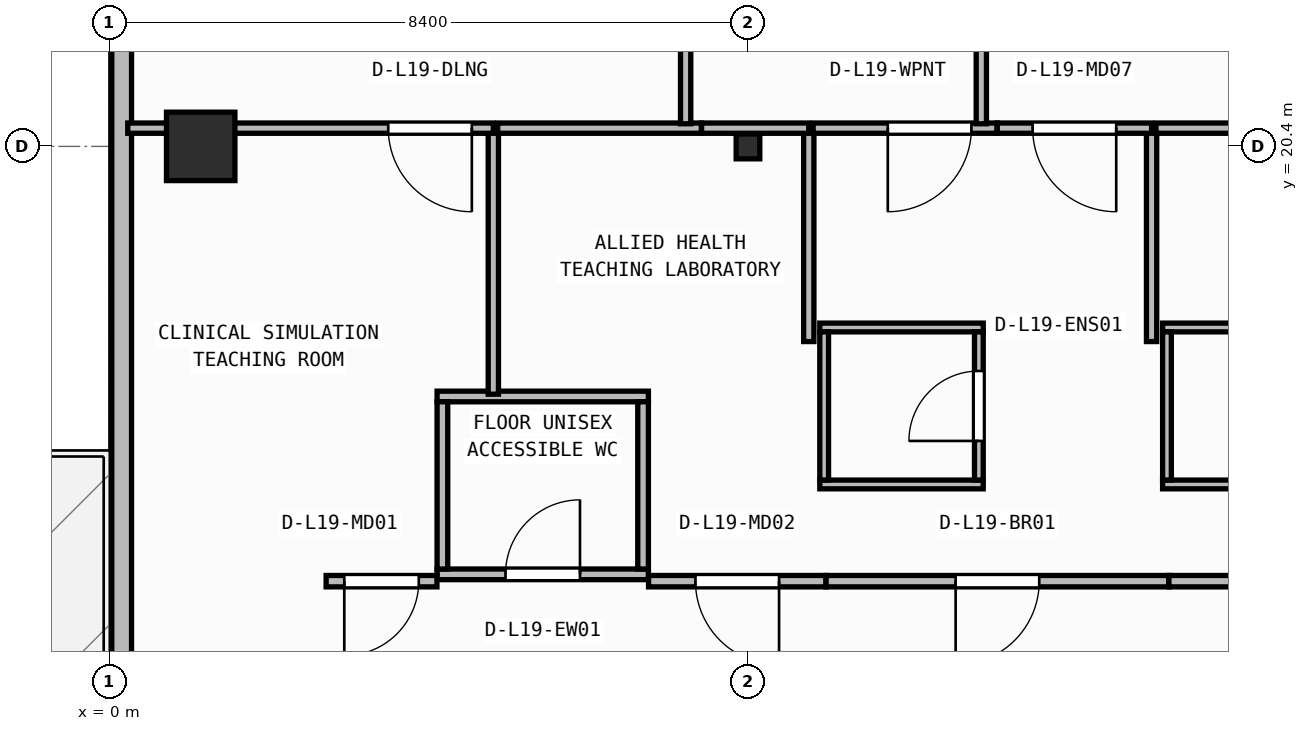
"""IFC4 building model, lengths in metres.
Left out: names, types, materials, properties, quantities, classifications, styles, units other than length and angle.
Written with IfcOpenShell. Run it as: python <this file> out.ifc"""

import sys

from ifc_helpers import new_model, si_unit, direction, frame, frame_2d, origin, origin_2d, place, context, subcontext, project, spatial, rectangle, i_section, extrude, element, fill, save


model = new_model("IFC4")
c1 = context("Model", 3, precision=1e-05, world=origin(), true_north=direction((0.0, 1.0)))
c2 = subcontext(c1, "Body", "Model", "MODEL_VIEW")
j1 = project(units=[si_unit("LENGTHUNIT", "METRE"), si_unit("PLANEANGLEUNIT", "RADIAN")], contexts=[c1])
p1 = place(None, origin())
s1 = spatial("IfcSite", under=j1, at=p1, CompositionType="ELEMENT")
p2 = place(p1, origin())
s2 = spatial("IfcBuilding", under=s1, at=p2, CompositionType="ELEMENT")
p3 = place(p2, frame((0.0, 0.0, 77.8)))
s3 = spatial("IfcBuildingStorey", under=s2, at=p3, CompositionType="ELEMENT", Elevation=77.8)
p4 = place(p3, frame((1.2, 20.4, 0.0), z_axis=(0.0, 0.0, 1.0), x_axis=(1.0, 0.0, 0.0)))
e1 = element("IfcColumn", 1, at=p4, inside=s3, PredefinedType="COLUMN", context=c2, shape_type="SweptSolid", body=[
    extrude(rectangle(XDim=0.9, YDim=0.9, at=origin_2d()), origin(), (0.0, 0.0, 1.0), 3.95),
])
p5 = place(p3, frame((8.4, 20.4, 0.0), z_axis=(0.0, 0.0, 1.0), x_axis=(1.0, 0.0, 0.0)))
e2 = element("IfcColumn", 2, at=p5, inside=s3, PredefinedType="COLUMN", context=c2, shape_type="SweptSolid", body=[
    extrude(i_section(OverallWidth=0.311, OverallDepth=0.327, WebThickness=0.016, FlangeThickness=0.025, FilletRadius=0.017, at=origin_2d()), origin(), (0.0, 0.0, 1.0), 3.95),
])
p6 = place(p3, frame((0.16, 41.04, 0.0), z_axis=(0.0, 0.0, 1.0), x_axis=(0.0, -1.0, 0.0)))
e3 = element("IfcWall", 3, at=p6, inside=s3, PredefinedType="STANDARD", context=c2, shape_type="SweptSolid", body=[
    extrude(rectangle(XDim=38.28, YDim=0.26, at=frame_2d((19.14, 0.0))), origin(), (0.0, 0.0, 1.0), 3.71),
])
p7 = place(p6, frame((30.187, 0.0, 0.0)))
e4 = element("IfcOpeningElement", 4, at=p7, cuts=e3, PredefinedType="OPENING", context=c2, shape_type="SweptSolid", body=[
    extrude(rectangle(XDim=1.3, YDim=2.15, at=frame_2d((0.65, 1.075))), frame((0.0, 0.14, 0.0), z_axis=(0.0, -1.0, 0.0), x_axis=(1.0, 0.0, 0.0)), (0.0, 0.0, 1.0), 0.28),
])
p8 = place(p3, frame((4.31, 14.77, 0.0), z_axis=(0.0, 0.0, 1.0), x_axis=(1.0, 0.0, 0.0)))
e5 = element("IfcWall", 5, at=p8, inside=s3, PredefinedType="PARTITIONING", context=c2, shape_type="SweptSolid", body=[
    extrude(rectangle(XDim=2.78, YDim=0.14, at=frame_2d((1.39, 0.0))), origin(), (0.0, 0.0, 1.0), 3.71),
])
p9 = place(p8, frame((0.9, 0.0, 0.0)))
e6 = element("IfcOpeningElement", 6, at=p9, cuts=e5, PredefinedType="OPENING", context=c2, shape_type="SweptSolid", body=[
    extrude(rectangle(XDim=0.98, YDim=2.1, at=frame_2d((0.49, 1.05))), frame((0.0, 0.08, 0.0), z_axis=(0.0, -1.0, 0.0), x_axis=(1.0, 0.0, 0.0)), (0.0, 0.0, 1.0), 0.16),
])
p10 = place(p3, frame((4.31, 17.11, 0.0), z_axis=(0.0, 0.0, 1.0), x_axis=(1.0, 0.0, 0.0)))
e7 = element("IfcWall", 7, at=p10, inside=s3, PredefinedType="PARTITIONING", context=c2, shape_type="SweptSolid", body=[
    extrude(rectangle(XDim=2.78, YDim=0.14, at=frame_2d((1.39, 0.0))), origin(), (0.0, 0.0, 1.0), 3.71),
])
for number, where, z_axis, x_axis in (
    (8, (4.38, 14.84, 0.0), (0.0, 0.0, 1.0), (0.0, 1.0, 0.0)),
    (9, (7.02, 14.84, 0.0), (0.0, 0.0, 1.0), (0.0, 1.0, 0.0)),
):
    element("IfcWall", number, at=place(p3, frame(where, z_axis=z_axis, x_axis=x_axis)), inside=s3, PredefinedType="PARTITIONING", context=c2, shape_type="SweptSolid", body=[
        extrude(rectangle(XDim=2.2, YDim=0.14, at=frame_2d((1.1, 0.0))), origin(), (0.0, 0.0, 1.0), 3.71),
    ])
for number, where, z_axis, x_axis in (
    (10, (9.345, 15.952, 0.0), (0.0, 0.0, 1.0), (1.0, 0.0, 0.0)),
    (11, (9.345, 18.018, 0.0), (0.0, 0.0, 1.0), (1.0, 0.0, 0.0)),
):
    element("IfcWall", number, at=place(p3, frame(where, z_axis=z_axis, x_axis=x_axis)), inside=s3, PredefinedType="PARTITIONING", context=c2, shape_type="SweptSolid", body=[
        extrude(rectangle(XDim=2.15, YDim=0.115, at=frame_2d((1.075, 0.0))), origin(), (0.0, 0.0, 1.0), 3.71),
    ])
p11 = place(p3, frame((9.403, 16.01, 0.0), z_axis=(0.0, 0.0, 1.0), x_axis=(0.0, 1.0, 0.0)))
e12 = element("IfcWall", 12, at=p11, inside=s3, PredefinedType="PARTITIONING", context=c2, shape_type="SweptSolid", body=[
    extrude(rectangle(XDim=1.95, YDim=0.115, at=frame_2d((0.975, 0.0))), origin(), (0.0, 0.0, 1.0), 3.71),
])
p12 = place(p3, frame((11.438, 16.01, 0.0), z_axis=(0.0, 0.0, 1.0), x_axis=(0.0, 1.0, 0.0)))
e13 = element("IfcWall", 13, at=p12, inside=s3, PredefinedType="PARTITIONING", context=c2, shape_type="SweptSolid", body=[
    extrude(rectangle(XDim=1.95, YDim=0.115, at=frame_2d((0.975, 0.0))), origin(), (0.0, 0.0, 1.0), 3.71),
])
p13 = place(p12, frame((0.515, 0.0, 0.0)))
e14 = element("IfcOpeningElement", 14, at=p13, cuts=e13, PredefinedType="OPENING", context=c2, shape_type="SweptSolid", body=[
    extrude(rectangle(XDim=0.92, YDim=2.1, at=frame_2d((0.46, 1.05))), frame((0.0, 0.067, 0.0), z_axis=(0.0, -1.0, 0.0), x_axis=(1.0, 0.0, 0.0)), (0.0, 0.0, 1.0), 0.135),
])
for number, where, z_axis, x_axis in (
    (15, (13.855, 15.952, 0.0), (0.0, 0.0, 1.0), (1.0, 0.0, 0.0)),
    (16, (13.855, 18.018, 0.0), (0.0, 0.0, 1.0), (1.0, 0.0, 0.0)),
):
    element("IfcWall", number, at=place(p3, frame(where, z_axis=z_axis, x_axis=x_axis)), inside=s3, PredefinedType="PARTITIONING", context=c2, shape_type="SweptSolid", body=[
        extrude(rectangle(XDim=2.15, YDim=0.115, at=frame_2d((1.075, 0.0))), origin(), (0.0, 0.0, 1.0), 3.71),
    ])
p14 = place(p3, frame((13.913, 16.01, 0.0), z_axis=(0.0, 0.0, 1.0), x_axis=(0.0, 1.0, 0.0)))
e17 = element("IfcWall", 17, at=p14, inside=s3, PredefinedType="PARTITIONING", context=c2, shape_type="SweptSolid", body=[
    extrude(rectangle(XDim=1.95, YDim=0.115, at=frame_2d((0.975, 0.0))), origin(), (0.0, 0.0, 1.0), 3.71),
])
p15 = place(p3, frame((4.308, 14.68, 0.0), z_axis=(0.0, 0.0, 1.0), x_axis=(-1.0, 0.0, 0.0)))
e18 = element("IfcWall", 18, at=p15, inside=s3, PredefinedType="PARTITIONING", context=c2, shape_type="SweptSolid", body=[
    extrude(rectangle(XDim=1.458, YDim=0.15, at=frame_2d((0.729, 0.0))), origin(), (0.0, 0.0, 1.0), 3.71),
])
p16 = place(p15, frame((0.239, 0.0, 0.0)))
e19 = element("IfcOpeningElement", 19, at=p16, cuts=e18, PredefinedType="OPENING", context=c2, shape_type="SweptSolid", body=[
    extrude(rectangle(XDim=0.98, YDim=2.1, at=frame_2d((0.49, 1.05))), frame((0.0, 0.085, 0.0), z_axis=(0.0, -1.0, 0.0), x_axis=(1.0, 0.0, 0.0)), (0.0, 0.0, 1.0), 0.17),
])
p17 = place(p3, frame((9.426, 14.68, 0.0), z_axis=(0.0, 0.0, 1.0), x_axis=(-1.0, 0.0, 0.0)))
e20 = element("IfcWall", 20, at=p17, inside=s3, PredefinedType="PARTITIONING", context=c2, shape_type="SweptSolid", body=[
    extrude(rectangle(XDim=2.334, YDim=0.15, at=frame_2d((1.167, 0.0))), origin(), (0.0, 0.0, 1.0), 3.71),
])
p18 = place(p17, frame((0.617, 0.0, 0.0)))
e21 = element("IfcOpeningElement", 21, at=p18, cuts=e20, PredefinedType="OPENING", context=c2, shape_type="SweptSolid", body=[
    extrude(rectangle(XDim=1.1, YDim=2.1, at=frame_2d((0.55, 1.05))), frame((0.0, 0.085, 0.0), z_axis=(0.0, -1.0, 0.0), x_axis=(1.0, 0.0, 0.0)), (0.0, 0.0, 1.0), 0.17),
])
p19 = place(p3, frame((13.936, 14.68, 0.0), z_axis=(0.0, 0.0, 1.0), x_axis=(-1.0, 0.0, 0.0)))
e22 = element("IfcWall", 22, at=p19, inside=s3, PredefinedType="PARTITIONING", context=c2, shape_type="SweptSolid", body=[
    extrude(rectangle(XDim=4.508, YDim=0.15, at=frame_2d((2.254, 0.0))), origin(), (0.0, 0.0, 1.0), 3.71),
])
p20 = place(p19, frame((1.704, 0.0, 0.0)))
e23 = element("IfcOpeningElement", 23, at=p20, cuts=e22, PredefinedType="OPENING", context=c2, shape_type="SweptSolid", body=[
    extrude(rectangle(XDim=1.1, YDim=2.1, at=frame_2d((0.55, 1.05))), frame((0.0, 0.085, 0.0), z_axis=(0.0, -1.0, 0.0), x_axis=(1.0, 0.0, 0.0)), (0.0, 0.0, 1.0), 0.17),
])
p21 = place(p3, frame((18.806, 14.68, 0.0), z_axis=(0.0, 0.0, 1.0), x_axis=(-1.0, 0.0, 0.0)))
e24 = element("IfcWall", 24, at=p21, inside=s3, PredefinedType="PARTITIONING", context=c2, shape_type="SweptSolid", body=[
    extrude(rectangle(XDim=4.868, YDim=0.15, at=frame_2d((2.434, 0.0))), origin(), (0.0, 0.0, 1.0), 3.71),
])
p22 = place(p21, frame((1.884, 0.0, 0.0)))
e25 = element("IfcOpeningElement", 25, at=p22, cuts=e24, PredefinedType="OPENING", context=c2, shape_type="SweptSolid", body=[
    extrude(rectangle(XDim=1.1, YDim=2.1, at=frame_2d((0.55, 1.05))), frame((0.0, 0.085, 0.0), z_axis=(0.0, -1.0, 0.0), x_axis=(1.0, 0.0, 0.0)), (0.0, 0.0, 1.0), 0.17),
])
p23 = place(p3, frame((5.05, 17.14, 0.0), z_axis=(0.0, 0.0, 1.0), x_axis=(0.0, 1.0, 0.0)))
e26 = element("IfcWall", 26, at=p23, inside=s3, PredefinedType="PARTITIONING", context=c2, shape_type="SweptSolid", body=[
    extrude(rectangle(XDim=3.5, YDim=0.135, at=frame_2d((1.75, 0.0))), origin(), (0.0, 0.0, 1.0), 3.71),
])
p24 = place(p3, frame((5.05, 20.64, 0.0), z_axis=(0.0, 0.0, 1.0), x_axis=(-1.0, 0.0, 0.0)))
e27 = element("IfcWall", 27, at=p24, inside=s3, PredefinedType="PARTITIONING", context=c2, shape_type="SweptSolid", body=[
    extrude(rectangle(XDim=4.81, YDim=0.135, at=frame_2d((2.405, 0.0))), origin(), (0.0, 0.0, 1.0), 3.073),
])
p25 = place(p24, frame((0.283, 0.0, 0.0)))
e28 = element("IfcOpeningElement", 28, at=p25, cuts=e27, PredefinedType="OPENING", context=c2, shape_type="SweptSolid", body=[
    extrude(rectangle(XDim=1.1, YDim=2.1, at=frame_2d((0.55, 1.05))), frame((0.0, 0.077, 0.0), z_axis=(0.0, -1.0, 0.0), x_axis=(1.0, 0.0, 0.0)), (0.0, 0.0, 1.0), 0.155),
])
p26 = place(p3, frame((9.2, 17.833, 0.0), z_axis=(0.0, 0.0, 1.0), x_axis=(0.0, 1.0, 0.0)))
e29 = element("IfcWall", 29, at=p26, inside=s3, PredefinedType="PARTITIONING", context=c2, shape_type="SweptSolid", body=[
    extrude(rectangle(XDim=2.807, YDim=0.135, at=frame_2d((1.404, 0.0))), origin(), (0.0, 0.0, 1.0), 3.71),
])
p27 = place(p3, frame((7.788, 20.64, 0.0), z_axis=(0.0, 0.0, 1.0), x_axis=(-1.0, 0.0, 0.0)))
e30 = element("IfcWall", 30, at=p27, inside=s3, PredefinedType="PARTITIONING", context=c2, shape_type="SweptSolid", body=[
    extrude(rectangle(XDim=2.68, YDim=0.135, at=frame_2d((1.34, 0.0))), origin(), (0.0, 0.0, 1.0), 3.073),
])
p28 = place(p3, frame((9.2, 20.64, 0.0), z_axis=(0.0, 0.0, 1.0), x_axis=(-1.0, 0.0, 0.0)))
e31 = element("IfcWall", 31, at=p28, inside=s3, PredefinedType="PARTITIONING", context=c2, shape_type="SweptSolid", body=[
    extrude(rectangle(XDim=1.41, YDim=0.135, at=frame_2d((0.705, 0.0))), origin(), (0.0, 0.0, 1.0), 3.073),
])
p29 = place(p3, frame((13.71, 17.833, 0.0), z_axis=(0.0, 0.0, 1.0), x_axis=(0.0, 1.0, 0.0)))
e32 = element("IfcWall", 32, at=p29, inside=s3, PredefinedType="PARTITIONING", context=c2, shape_type="SweptSolid", body=[
    extrude(rectangle(XDim=2.807, YDim=0.135, at=frame_2d((1.404, 0.0))), origin(), (0.0, 0.0, 1.0), 3.71),
])
p30 = place(p3, frame((11.677, 20.64, 0.0), z_axis=(0.0, 0.0, 1.0), x_axis=(-1.0, 0.0, 0.0)))
e33 = element("IfcWall", 33, at=p30, inside=s3, PredefinedType="PARTITIONING", context=c2, shape_type="SweptSolid", body=[
    extrude(rectangle(XDim=2.42, YDim=0.135, at=frame_2d((1.21, 0.0))), origin(), (0.0, 0.0, 1.0), 3.073),
])
p31 = place(p30, frame((0.338, 0.0, 0.0)))
e34 = element("IfcOpeningElement", 34, at=p31, cuts=e33, PredefinedType="OPENING", context=c2, shape_type="SweptSolid", body=[
    extrude(rectangle(XDim=1.1, YDim=2.1, at=frame_2d((0.55, 1.05))), frame((0.0, 0.077, 0.0), z_axis=(0.0, -1.0, 0.0), x_axis=(1.0, 0.0, 0.0)), (0.0, 0.0, 1.0), 0.155),
])
p32 = place(p3, frame((13.71, 20.64, 0.0), z_axis=(0.0, 0.0, 1.0), x_axis=(-1.0, 0.0, 0.0)))
e35 = element("IfcWall", 35, at=p32, inside=s3, PredefinedType="PARTITIONING", context=c2, shape_type="SweptSolid", body=[
    extrude(rectangle(XDim=2.031, YDim=0.135, at=frame_2d((1.015, 0.0))), origin(), (0.0, 0.0, 1.0), 3.073),
])
p33 = place(p32, frame((0.465, 0.0, 0.0)))
e36 = element("IfcOpeningElement", 36, at=p33, cuts=e35, PredefinedType="OPENING", context=c2, shape_type="SweptSolid", body=[
    extrude(rectangle(XDim=1.1, YDim=2.1, at=frame_2d((0.55, 1.05))), frame((0.0, 0.077, 0.0), z_axis=(0.0, -1.0, 0.0), x_axis=(1.0, 0.0, 0.0)), (0.0, 0.0, 1.0), 0.155),
])
p34 = place(p3, frame((18.58, 20.64, 0.0), z_axis=(0.0, 0.0, 1.0), x_axis=(-1.0, 0.0, 0.0)))
e37 = element("IfcWall", 37, at=p34, inside=s3, PredefinedType="PARTITIONING", context=c2, shape_type="SweptSolid", body=[
    extrude(rectangle(XDim=4.812, YDim=0.135, at=frame_2d((2.406, 0.0))), origin(), (0.0, 0.0, 1.0), 3.073),
])
p35 = place(p3, frame((7.58, 20.698, 0.0), z_axis=(0.0, 0.0, 1.0), x_axis=(0.0, 1.0, 0.0)))
e38 = element("IfcWall", 38, at=p35, inside=s3, PredefinedType="PARTITIONING", context=c2, shape_type="SweptSolid", body=[
    extrude(rectangle(XDim=19.524, YDim=0.135, at=frame_2d((9.762, 0.0))), origin(), (0.0, 0.0, 1.0), 3.71),
])
p36 = place(p3, frame((11.47, 20.698, 0.0), z_axis=(0.0, 0.0, 1.0), x_axis=(0.0, 1.0, 0.0)))
e39 = element("IfcWall", 39, at=p36, inside=s3, PredefinedType="PARTITIONING", context=c2, shape_type="SweptSolid", body=[
    extrude(rectangle(XDim=16.881, YDim=0.135, at=frame_2d((8.44, 0.0))), origin(), (0.0, 0.0, 1.0), 3.71),
])
p37 = place(p9, origin())
e40 = element("IfcDoor", 40, at=p37, inside=s3, OperationType="SINGLE_SWING_RIGHT", PredefinedType="DOOR", context=c2, shape_type="SweptSolid", body=[
    extrude(rectangle(XDim=0.98, YDim=2.1, at=frame_2d((0.49, 1.05))), frame((0.0, 0.025, 0.0), z_axis=(0.0, -1.0, 0.0), x_axis=(1.0, 0.0, 0.0)), (0.0, 0.0, 1.0), 0.05),
])
fill(e6, e40)
p38 = place(p13, origin())
e41 = element("IfcDoor", 41, at=p38, inside=s3, OperationType="SINGLE_SWING_LEFT", PredefinedType="DOOR", context=c2, shape_type="SweptSolid", body=[
    extrude(rectangle(XDim=0.92, YDim=2.1, at=frame_2d((0.46, 1.05))), frame((0.0, 0.025, 0.0), z_axis=(0.0, -1.0, 0.0), x_axis=(1.0, 0.0, 0.0)), (0.0, 0.0, 1.0), 0.05),
])
fill(e14, e41)
p39 = place(p16, origin())
e42 = element("IfcDoor", 42, at=p39, inside=s3, OperationType="SINGLE_SWING_RIGHT", PredefinedType="DOOR", context=c2, shape_type="SweptSolid", body=[
    extrude(rectangle(XDim=0.98, YDim=2.1, at=frame_2d((0.49, 1.05))), frame((0.0, 0.025, 0.0), z_axis=(0.0, -1.0, 0.0), x_axis=(1.0, 0.0, 0.0)), (0.0, 0.0, 1.0), 0.05),
])
fill(e19, e42)
p40 = place(p18, origin())
e43 = element("IfcDoor", 43, at=p40, inside=s3, OperationType="SINGLE_SWING_LEFT", PredefinedType="DOOR", context=c2, shape_type="SweptSolid", body=[
    extrude(rectangle(XDim=1.1, YDim=2.1, at=frame_2d((0.55, 1.05))), frame((0.0, 0.025, 0.0), z_axis=(0.0, -1.0, 0.0), x_axis=(1.0, 0.0, 0.0)), (0.0, 0.0, 1.0), 0.05),
])
fill(e21, e43)
p41 = place(p20, origin())
e44 = element("IfcDoor", 44, at=p41, inside=s3, OperationType="SINGLE_SWING_RIGHT", PredefinedType="DOOR", context=c2, shape_type="SweptSolid", body=[
    extrude(rectangle(XDim=1.1, YDim=2.1, at=frame_2d((0.55, 1.05))), frame((0.0, 0.025, 0.0), z_axis=(0.0, -1.0, 0.0), x_axis=(1.0, 0.0, 0.0)), (0.0, 0.0, 1.0), 0.05),
])
fill(e23, e44)
p42 = place(p25, origin())
e45 = element("IfcDoor", 45, at=p42, inside=s3, OperationType="SINGLE_SWING_LEFT", PredefinedType="DOOR", context=c2, shape_type="SweptSolid", body=[
    extrude(rectangle(XDim=1.1, YDim=2.1, at=frame_2d((0.55, 1.05))), frame((0.0, 0.025, 0.0), z_axis=(0.0, -1.0, 0.0), x_axis=(1.0, 0.0, 0.0)), (0.0, 0.0, 1.0), 0.05),
])
fill(e28, e45)
p43 = place(p31, origin())
e46 = element("IfcDoor", 46, at=p43, inside=s3, OperationType="SINGLE_SWING_RIGHT", PredefinedType="DOOR", context=c2, shape_type="SweptSolid", body=[
    extrude(rectangle(XDim=1.1, YDim=2.1, at=frame_2d((0.55, 1.05))), frame((0.0, 0.025, 0.0), z_axis=(0.0, -1.0, 0.0), x_axis=(1.0, 0.0, 0.0)), (0.0, 0.0, 1.0), 0.05),
])
fill(e34, e46)
p44 = place(p33, origin())
e47 = element("IfcDoor", 47, at=p44, inside=s3, OperationType="SINGLE_SWING_LEFT", PredefinedType="DOOR", context=c2, shape_type="SweptSolid", body=[
    extrude(rectangle(XDim=1.1, YDim=2.1, at=frame_2d((0.55, 1.05))), frame((0.0, 0.025, 0.0), z_axis=(0.0, -1.0, 0.0), x_axis=(1.0, 0.0, 0.0)), (0.0, 0.0, 1.0), 0.05),
])
fill(e36, e47)
save(model, sys.argv[1])
